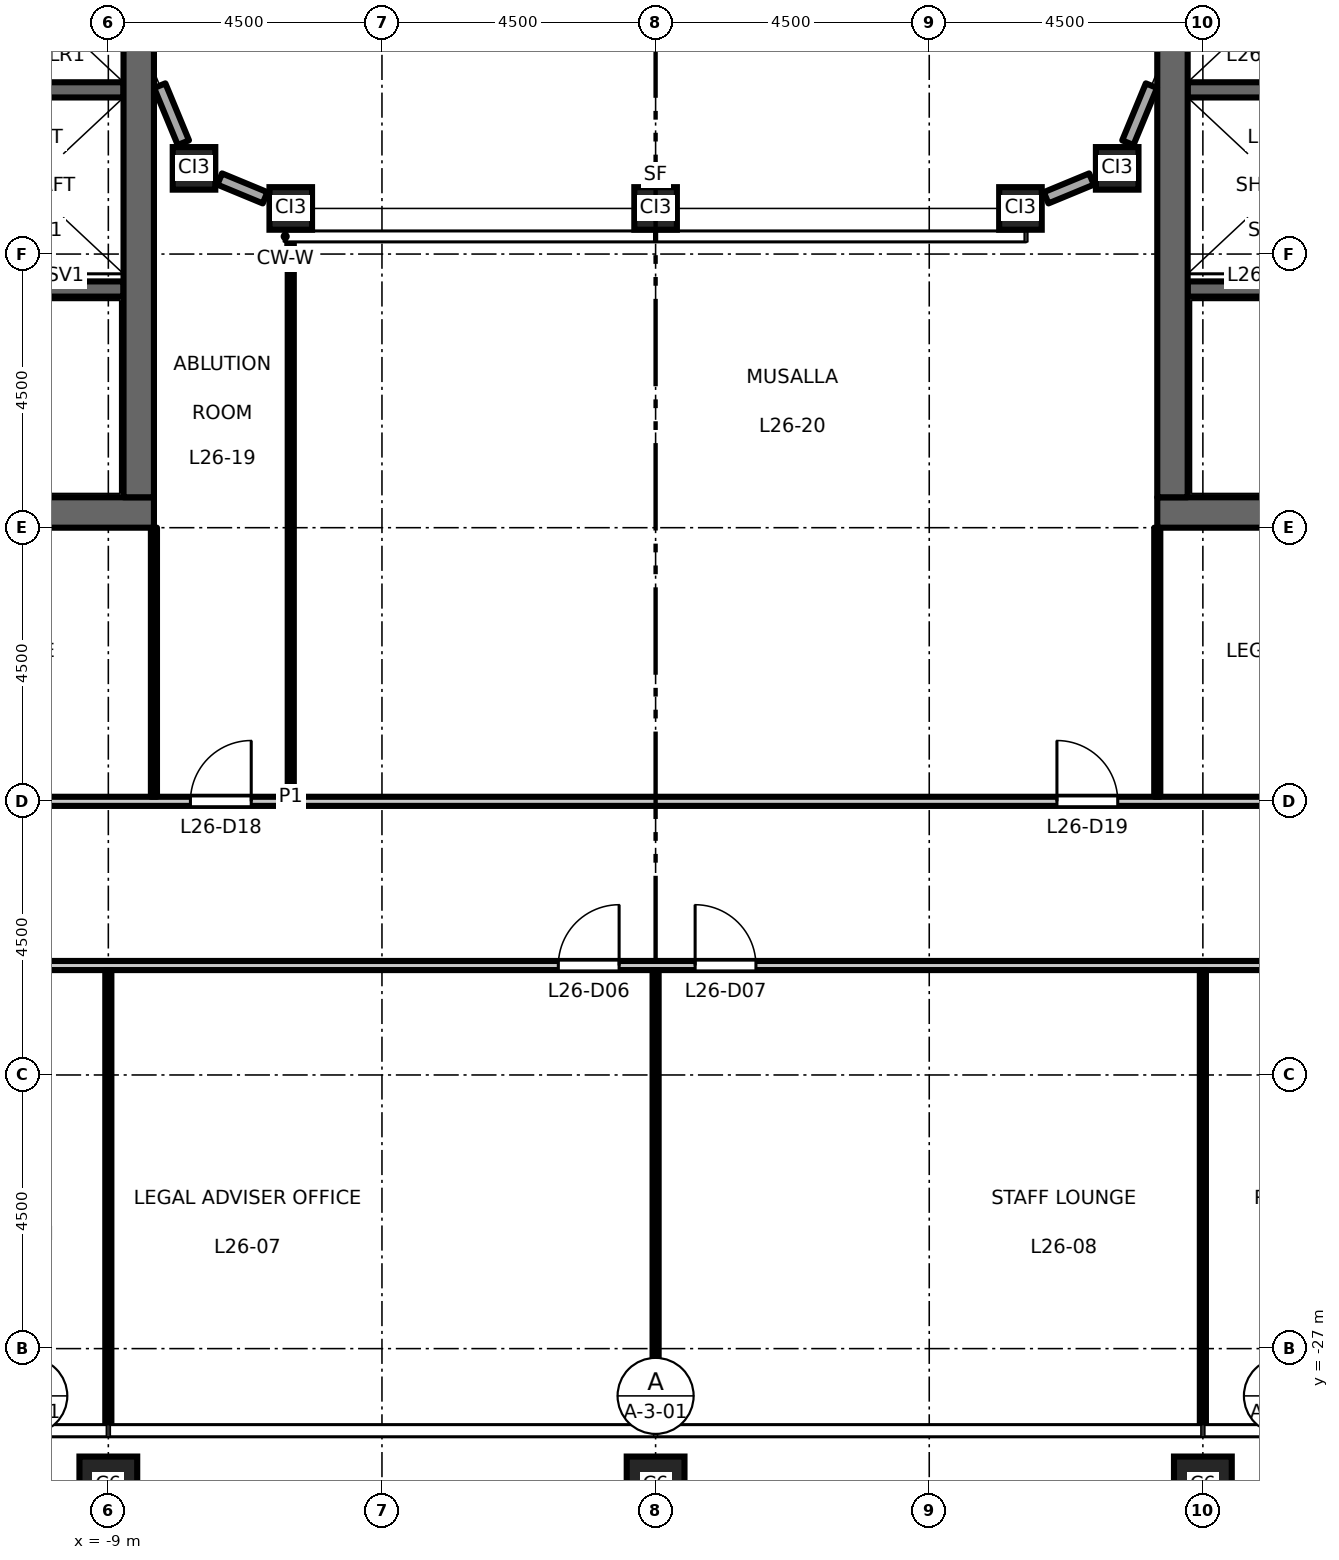
"""IFC4 building model, lengths in metres.
Left out: names, types, materials, properties, quantities, classifications, styles, units other than length and angle.
Written with IfcOpenShell. Run it as: python <this file> out.ifc"""

import sys

from ifc_helpers import new_model, si_unit, direction, frame, frame_2d, origin, origin_2d, place, context, subcontext, project, spatial, rectangle, hollow_rectangle, extrude, element, fill, save


model = new_model("IFC4")
c1 = context("Model", 3, precision=1e-05, world=origin(), true_north=direction((0.0, 1.0)))
c2 = subcontext(c1, "Body", "Model", "MODEL_VIEW")
j1 = project(units=[si_unit("LENGTHUNIT", "METRE"), si_unit("PLANEANGLEUNIT", "RADIAN")], contexts=[c1])
p1 = place(None, origin())
s1 = spatial("IfcSite", under=j1, at=p1, CompositionType="ELEMENT")
p2 = place(p1, origin())
s2 = spatial("IfcBuilding", under=s1, at=p2, CompositionType="ELEMENT")
p3 = place(p2, frame((0.0, 0.0, 122.7)))
s3 = spatial("IfcBuildingStorey", under=s2, at=p3, CompositionType="ELEMENT", Elevation=122.7)
for number, where, z_axis, x_axis in (
    (1, (-9.0, -29.25, 0.0), (0.0, 0.0, 1.0), (1.0, 0.0, 0.0)),
    (2, (0.0, -29.25, 0.0), (0.0, 0.0, 1.0), (1.0, 0.0, 0.0)),
    (3, (9.0, -29.25, 0.0), (0.0, 0.0, 1.0), (1.0, 0.0, 0.0)),
):
    element("IfcColumn", number, at=place(p3, frame(where, z_axis=z_axis, x_axis=x_axis)), inside=s3, PredefinedType="COLUMN", context=c2, shape_type="SweptSolid", body=[
        extrude(hollow_rectangle(XDim=0.95, YDim=0.95, WallThickness=0.055, at=origin_2d()), origin(), (0.0, 0.0, 1.0), 4.5),
    ])
for number, where, z_axis, x_axis in (
    (4, (-7.591, -7.591, 0.0), (0.0, 0.0, 1.0), (1.0, 0.0, 0.0)),
    (5, (-6.0, -8.25, 0.0), (0.0, 0.0, 1.0), (1.0, 0.0, 0.0)),
    (6, (0.0, -8.25, 0.0), (0.0, 0.0, 1.0), (1.0, 0.0, 0.0)),
    (7, (6.0, -8.25, 0.0), (0.0, 0.0, 1.0), (1.0, 0.0, 0.0)),
    (8, (7.591, -7.591, 0.0), (0.0, 0.0, 1.0), (1.0, 0.0, 0.0)),
):
    element("IfcColumn", number, at=place(p3, frame(where, z_axis=z_axis, x_axis=x_axis)), inside=s3, PredefinedType="COLUMN", context=c2, shape_type="SweptSolid", body=[
        extrude(hollow_rectangle(XDim=0.7, YDim=0.7, WallThickness=0.04, at=origin_2d()), origin(), (0.0, 0.0, 1.0), 4.5),
    ])
p4 = place(p3, frame((-8.75, -6.3, 0.0), z_axis=(0.0, 0.0, 1.0), x_axis=(-1.0, 0.0, 0.0)))
e9 = element("IfcWall", 9, at=p4, inside=s3, PredefinedType="SHEAR", context=c2, shape_type="SweptSolid", body=[
    extrude(rectangle(XDim=3.1, YDim=0.25, at=frame_2d((1.55, 0.0))), origin(), (0.0, 0.0, 1.0), 4.35),
])
p5 = place(p3, frame((-8.75, -9.575, 0.0), z_axis=(0.0, 0.0, 1.0), x_axis=(-1.0, 0.0, 0.0)))
e10 = element("IfcWall", 10, at=p5, inside=s3, PredefinedType="SHEAR", context=c2, shape_type="SweptSolid", body=[
    extrude(rectangle(XDim=8.0, YDim=0.25, at=frame_2d((4.0, 0.0))), origin(), (0.0, 0.0, 1.0), 4.35),
])
p6 = place(p5, frame((6.65, 0.0, 0.0)))
e11 = element("IfcOpeningElement", 11, at=p6, cuts=e10, PredefinedType="OPENING", context=c2, shape_type="SweptSolid", body=[
    extrude(rectangle(XDim=1.1, YDim=2.1, at=frame_2d((0.55, 1.05))), frame((0.0, 0.135, 0.0), z_axis=(0.0, -1.0, 0.0), x_axis=(1.0, 0.0, 0.0)), (0.0, 0.0, 1.0), 0.27),
])
p7 = place(p3, frame((-8.25, -13.25, 0.0), z_axis=(0.0, 0.0, 1.0), x_axis=(-1.0, 0.0, 0.0)))
e12 = element("IfcWall", 12, at=p7, inside=s3, PredefinedType="SHEAR", context=c2, shape_type="SweptSolid", body=[
    extrude(rectangle(XDim=13.5, YDim=0.5, at=frame_2d((6.75, 0.0))), origin(), (0.0, 0.0, 1.0), 4.35),
])
p8 = place(p3, frame((-8.5, -13.0, 0.0), z_axis=(0.0, 0.0, 1.0), x_axis=(0.0, 1.0, 0.0)))
e13 = element("IfcWall", 13, at=p8, inside=s3, PredefinedType="SHEAR", context=c2, shape_type="SweptSolid", body=[
    extrude(rectangle(XDim=26.0, YDim=0.5, at=frame_2d((13.0, 0.0))), origin(), (0.0, 0.0, 1.0), 4.35),
])
p9 = place(p3, frame((8.75, -6.3, 0.0), z_axis=(0.0, 0.0, 1.0), x_axis=(1.0, 0.0, 0.0)))
e14 = element("IfcWall", 14, at=p9, inside=s3, PredefinedType="SHEAR", context=c2, shape_type="SweptSolid", body=[
    extrude(rectangle(XDim=3.1, YDim=0.25, at=frame_2d((1.55, 0.0))), origin(), (0.0, 0.0, 1.0), 4.35),
])
p10 = place(p3, frame((8.75, -9.575, 0.0), z_axis=(0.0, 0.0, 1.0), x_axis=(1.0, 0.0, 0.0)))
e15 = element("IfcWall", 15, at=p10, inside=s3, PredefinedType="SHEAR", context=c2, shape_type="SweptSolid", body=[
    extrude(rectangle(XDim=8.0, YDim=0.25, at=frame_2d((4.0, 0.0))), origin(), (0.0, 0.0, 1.0), 4.35),
])
p11 = place(p10, frame((6.65, 0.0, 0.0)))
e16 = element("IfcOpeningElement", 16, at=p11, cuts=e15, PredefinedType="OPENING", context=c2, shape_type="SweptSolid", body=[
    extrude(rectangle(XDim=1.1, YDim=2.1, at=frame_2d((0.55, 1.05))), frame((0.0, 0.135, 0.0), z_axis=(0.0, -1.0, 0.0), x_axis=(1.0, 0.0, 0.0)), (0.0, 0.0, 1.0), 0.27),
])
p12 = place(p3, frame((8.25, -13.25, 0.0), z_axis=(0.0, 0.0, 1.0), x_axis=(1.0, 0.0, 0.0)))
e17 = element("IfcWall", 17, at=p12, inside=s3, PredefinedType="SHEAR", context=c2, shape_type="SweptSolid", body=[
    extrude(rectangle(XDim=13.5, YDim=0.5, at=frame_2d((6.75, 0.0))), origin(), (0.0, 0.0, 1.0), 4.35),
])
p13 = place(p3, frame((8.5, -13.0, 0.0), z_axis=(0.0, 0.0, 1.0), x_axis=(0.0, 1.0, 0.0)))
e18 = element("IfcWall", 18, at=p13, inside=s3, PredefinedType="SHEAR", context=c2, shape_type="SweptSolid", body=[
    extrude(rectangle(XDim=26.0, YDim=0.5, at=frame_2d((13.0, 0.0))), origin(), (0.0, 0.0, 1.0), 4.35),
])
p14 = place(p3, frame((6.423, -8.075, 0.0), z_axis=(0.0, 0.0, 1.0), x_axis=(0.923817771127, 0.382832503518, 0.0)))
e19 = element("IfcWall", 19, at=p14, inside=s3, PredefinedType="STANDARD", context=c2, shape_type="SweptSolid", body=[
    extrude(rectangle(XDim=0.807, YDim=0.2, at=frame_2d((0.404, 0.0))), origin(), (0.0, 0.0, 1.0), 3.826),
])
for number, where, z_axis, x_axis in (
    (20, (7.766, -7.168, 0.0), (0.0, 0.0, 1.0), (0.383, 0.924, 0.0)),
    (21, (-8.154, -6.231, 0.0), (0.0, 0.0, 1.0), (0.383, -0.924, 0.0)),
):
    element("IfcWall", number, at=place(p3, frame(where, z_axis=z_axis, x_axis=x_axis)), inside=s3, PredefinedType="STANDARD", context=c2, shape_type="SweptSolid", body=[
        extrude(rectangle(XDim=1.015, YDim=0.2, at=frame_2d((0.507, 0.0))), origin(), (0.0, 0.0, 1.0), 3.826),
    ])
p15 = place(p3, frame((-7.168, -7.766, 0.0), z_axis=(0.0, 0.0, 1.0), x_axis=(0.923817771127, -0.382832503518, 0.0)))
e22 = element("IfcWall", 22, at=p15, inside=s3, PredefinedType="STANDARD", context=c2, shape_type="SweptSolid", body=[
    extrude(rectangle(XDim=0.807, YDim=0.2, at=frame_2d((0.404, 0.0))), origin(), (0.0, 0.0, 1.0), 3.826),
])
p16 = place(p3, frame((-27.06, -20.7, 0.0), z_axis=(0.0, 0.0, 1.0), x_axis=(1.0, 0.0, 0.0)))
e23 = element("IfcWall", 23, at=p16, inside=s3, PredefinedType="PARTITIONING", context=c2, shape_type="SweptSolid", body=[
    extrude(rectangle(XDim=54.12, YDim=0.15, at=frame_2d((27.06, 0.0))), origin(), (0.0, 0.0, 1.0), 4.35),
])
p17 = place(p16, frame((9.71, 0.0, 0.0)))
e24 = element("IfcOpeningElement", 24, at=p17, cuts=e23, PredefinedType="OPENING", context=c2, shape_type="SweptSolid", body=[
    extrude(rectangle(XDim=1.0, YDim=2.1, at=frame_2d((0.5, 1.05))), frame((0.0, 0.085, 0.0), z_axis=(0.0, -1.0, 0.0), x_axis=(1.0, 0.0, 0.0)), (0.0, 0.0, 1.0), 0.17),
])
p18 = place(p16, frame((25.46, 0.0, 0.0)))
e25 = element("IfcOpeningElement", 25, at=p18, cuts=e23, PredefinedType="OPENING", context=c2, shape_type="SweptSolid", body=[
    extrude(rectangle(XDim=1.0, YDim=2.1, at=frame_2d((0.5, 1.05))), frame((0.0, 0.085, 0.0), z_axis=(0.0, -1.0, 0.0), x_axis=(1.0, 0.0, 0.0)), (0.0, 0.0, 1.0), 0.17),
])
p19 = place(p16, frame((27.71, 0.0, 0.0)))
e26 = element("IfcOpeningElement", 26, at=p19, cuts=e23, PredefinedType="OPENING", context=c2, shape_type="SweptSolid", body=[
    extrude(rectangle(XDim=1.0, YDim=2.1, at=frame_2d((0.5, 1.05))), frame((0.0, 0.085, 0.0), z_axis=(0.0, -1.0, 0.0), x_axis=(1.0, 0.0, 0.0)), (0.0, 0.0, 1.0), 0.17),
])
p20 = place(p16, frame((43.46, 0.0, 0.0)))
e27 = element("IfcOpeningElement", 27, at=p20, cuts=e23, PredefinedType="OPENING", context=c2, shape_type="SweptSolid", body=[
    extrude(rectangle(XDim=1.0, YDim=2.1, at=frame_2d((0.5, 1.05))), frame((0.0, 0.085, 0.0), z_axis=(0.0, -1.0, 0.0), x_axis=(1.0, 0.0, 0.0)), (0.0, 0.0, 1.0), 0.17),
])
p21 = place(p16, frame((0.65, 0.0, 0.0)))
e28 = element("IfcOpeningElement", 28, at=p21, cuts=e23, PredefinedType="OPENING", context=c2, shape_type="SweptSolid", body=[
    extrude(rectangle(XDim=1.0, YDim=2.1, at=frame_2d((0.5, 1.05))), frame((0.0, 0.085, 0.0), z_axis=(0.0, -1.0, 0.0), x_axis=(1.0, 0.0, 0.0)), (0.0, 0.0, 1.0), 0.17),
])
p22 = place(p16, frame((52.46, 0.0, 0.0)))
e29 = element("IfcOpeningElement", 29, at=p22, cuts=e23, PredefinedType="OPENING", context=c2, shape_type="SweptSolid", body=[
    extrude(rectangle(XDim=1.0, YDim=2.1, at=frame_2d((0.5, 1.05))), frame((0.0, 0.085, 0.0), z_axis=(0.0, -1.0, 0.0), x_axis=(1.0, 0.0, 0.0)), (0.0, 0.0, 1.0), 0.17),
])
p23 = place(p3, frame((-21.825, -18.0, 0.0), z_axis=(0.0, 0.0, 1.0), x_axis=(1.0, 0.0, 0.0)))
e30 = element("IfcWall", 30, at=p23, inside=s3, PredefinedType="PARTITIONING", context=c2, shape_type="SweptSolid", body=[
    extrude(rectangle(XDim=43.65, YDim=0.15, at=frame_2d((21.825, 0.0))), origin(), (0.0, 0.0, 1.0), 4.35),
])
p24 = place(p23, frame((14.175, 0.0, 0.0)))
e31 = element("IfcOpeningElement", 31, at=p24, cuts=e30, PredefinedType="OPENING", context=c2, shape_type="SweptSolid", body=[
    extrude(rectangle(XDim=1.0, YDim=2.1, at=frame_2d((0.5, 1.05))), frame((0.0, 0.085, 0.0), z_axis=(0.0, -1.0, 0.0), x_axis=(1.0, 0.0, 0.0)), (0.0, 0.0, 1.0), 0.17),
])
p25 = place(p23, frame((28.425, 0.0, 0.0)))
e32 = element("IfcOpeningElement", 32, at=p25, cuts=e30, PredefinedType="OPENING", context=c2, shape_type="SweptSolid", body=[
    extrude(rectangle(XDim=1.0, YDim=2.1, at=frame_2d((0.5, 1.05))), frame((0.0, 0.085, 0.0), z_axis=(0.0, -1.0, 0.0), x_axis=(1.0, 0.0, 0.0)), (0.0, 0.0, 1.0), 0.17),
])
p26 = place(p23, frame((0.675, 0.0, 0.0)))
e33 = element("IfcOpeningElement", 33, at=p26, cuts=e30, PredefinedType="OPENING", context=c2, shape_type="SweptSolid", body=[
    extrude(rectangle(XDim=1.0, YDim=2.1, at=frame_2d((0.5, 1.05))), frame((0.0, 0.085, 0.0), z_axis=(0.0, -1.0, 0.0), x_axis=(1.0, 0.0, 0.0)), (0.0, 0.0, 1.0), 0.17),
])
p27 = place(p23, frame((41.925, 0.0, 0.0)))
e34 = element("IfcOpeningElement", 34, at=p27, cuts=e30, PredefinedType="OPENING", context=c2, shape_type="SweptSolid", body=[
    extrude(rectangle(XDim=1.0, YDim=2.1, at=frame_2d((0.5, 1.05))), frame((0.0, 0.085, 0.0), z_axis=(0.0, -1.0, 0.0), x_axis=(1.0, 0.0, 0.0)), (0.0, 0.0, 1.0), 0.17),
])
p28 = place(p3, frame((-9.0, -28.26, 0.0), z_axis=(0.0, 0.0, 1.0), x_axis=(0.0, 1.0, 0.0)))
e35 = element("IfcWall", 35, at=p28, inside=s3, PredefinedType="PARTITIONING", context=c2, shape_type="SweptSolid", body=[
    extrude(rectangle(XDim=7.485, YDim=0.1, at=frame_2d((3.743, 0.0))), origin(), (0.0, 0.0, 1.0), 3.45),
])
p29 = place(p3, frame((-8.25, -17.925, 0.0), z_axis=(0.0, 0.0, 1.0), x_axis=(0.0, 1.0, 0.0)))
e36 = element("IfcWall", 36, at=p29, inside=s3, PredefinedType="PARTITIONING", context=c2, shape_type="SweptSolid", body=[
    extrude(rectangle(XDim=4.425, YDim=0.1, at=frame_2d((2.212, 0.0))), origin(), (0.0, 0.0, 1.0), 4.35),
])
p30 = place(p3, frame((-6.0, -17.925, 0.0), z_axis=(0.0, 0.0, 1.0), x_axis=(0.0, 1.0, 0.0)))
e37 = element("IfcWall", 37, at=p30, inside=s3, PredefinedType="PARTITIONING", context=c2, shape_type="SweptSolid", body=[
    extrude(rectangle(XDim=9.275, YDim=0.1, at=frame_2d((4.638, 0.0))), origin(), (0.0, 0.0, 1.0), 4.35),
])
p31 = place(p3, frame((0.0, -28.26, 0.0), z_axis=(0.0, 0.0, 1.0), x_axis=(0.0, 1.0, 0.0)))
e38 = element("IfcWall", 38, at=p31, inside=s3, PredefinedType="PARTITIONING", context=c2, shape_type="SweptSolid", body=[
    extrude(rectangle(XDim=7.485, YDim=0.1, at=frame_2d((3.743, 0.0))), origin(), (0.0, 0.0, 1.0), 3.45),
])
p32 = place(p3, frame((8.25, -17.925, 0.0), z_axis=(0.0, 0.0, 1.0), x_axis=(0.0, 1.0, 0.0)))
e39 = element("IfcWall", 39, at=p32, inside=s3, PredefinedType="PARTITIONING", context=c2, shape_type="SweptSolid", body=[
    extrude(rectangle(XDim=4.425, YDim=0.1, at=frame_2d((2.212, 0.0))), origin(), (0.0, 0.0, 1.0), 4.35),
])
p33 = place(p3, frame((9.0, -28.26, 0.0), z_axis=(0.0, 0.0, 1.0), x_axis=(0.0, 1.0, 0.0)))
e40 = element("IfcWall", 40, at=p33, inside=s3, PredefinedType="PARTITIONING", context=c2, shape_type="SweptSolid", body=[
    extrude(rectangle(XDim=7.485, YDim=0.1, at=frame_2d((3.743, 0.0))), origin(), (0.0, 0.0, 1.0), 3.45),
])
p34 = place(p18, origin())
e41 = element("IfcDoor", 41, at=p34, inside=s3, OperationType="SINGLE_SWING_RIGHT", PredefinedType="DOOR", context=c2, shape_type="SweptSolid", body=[
    extrude(rectangle(XDim=1.0, YDim=2.1, at=frame_2d((0.5, 1.05))), frame((0.0, 0.025, 0.0), z_axis=(0.0, -1.0, 0.0), x_axis=(1.0, 0.0, 0.0)), (0.0, 0.0, 1.0), 0.05),
])
fill(e25, e41)
p35 = place(p19, origin())
e42 = element("IfcDoor", 42, at=p35, inside=s3, OperationType="SINGLE_SWING_LEFT", PredefinedType="DOOR", context=c2, shape_type="SweptSolid", body=[
    extrude(rectangle(XDim=1.0, YDim=2.1, at=frame_2d((0.5, 1.05))), frame((0.0, 0.025, 0.0), z_axis=(0.0, -1.0, 0.0), x_axis=(1.0, 0.0, 0.0)), (0.0, 0.0, 1.0), 0.05),
])
fill(e26, e42)
p36 = place(p24, origin())
e43 = element("IfcDoor", 43, at=p36, inside=s3, OperationType="SINGLE_SWING_RIGHT", PredefinedType="DOOR", context=c2, shape_type="SweptSolid", body=[
    extrude(rectangle(XDim=1.0, YDim=2.1, at=frame_2d((0.5, 1.05))), frame((0.0, 0.025, 0.0), z_axis=(0.0, -1.0, 0.0), x_axis=(1.0, 0.0, 0.0)), (0.0, 0.0, 1.0), 0.05),
])
fill(e31, e43)
p37 = place(p25, origin())
e44 = element("IfcDoor", 44, at=p37, inside=s3, OperationType="SINGLE_SWING_LEFT", PredefinedType="DOOR", context=c2, shape_type="SweptSolid", body=[
    extrude(rectangle(XDim=1.0, YDim=2.1, at=frame_2d((0.5, 1.05))), frame((0.0, 0.025, 0.0), z_axis=(0.0, -1.0, 0.0), x_axis=(1.0, 0.0, 0.0)), (0.0, 0.0, 1.0), 0.05),
])
fill(e32, e44)
save(model, sys.argv[1])
